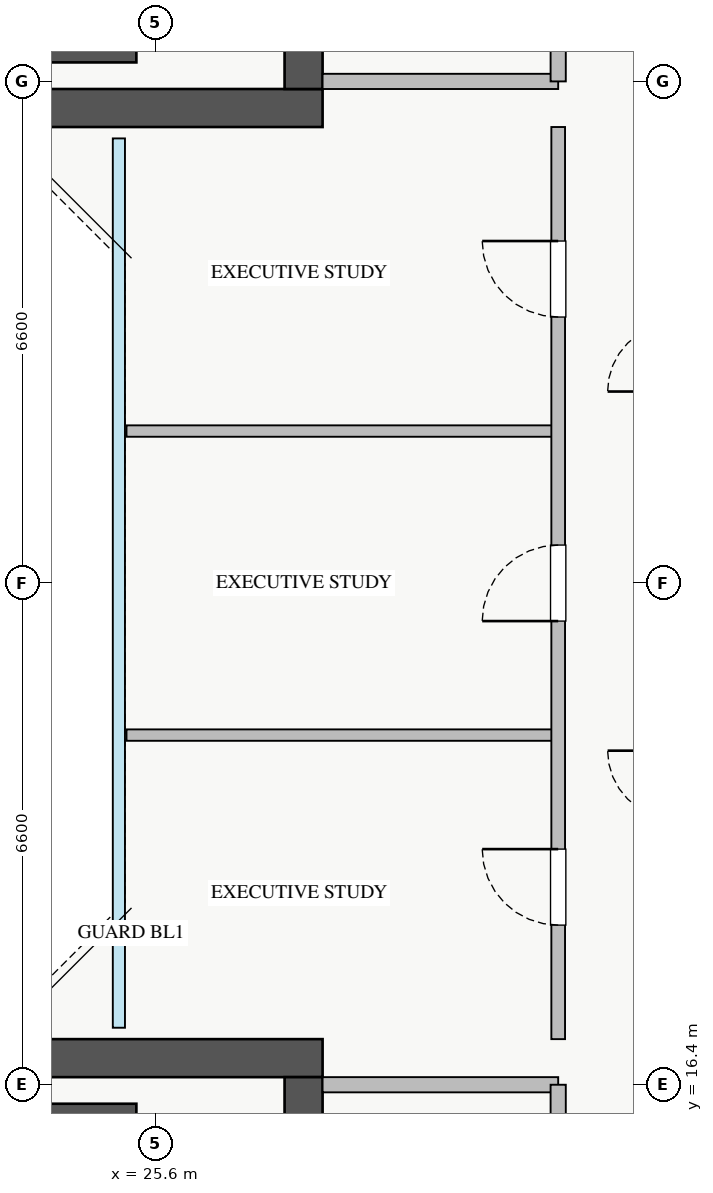
"""IFC4 building model, lengths in metres.
Left out: names, types, materials, properties, quantities, classifications, styles, units other than length and angle.
Written with IfcOpenShell. Run it as: python <this file> out.ifc"""

import sys

from ifc_helpers import new_model, si_unit, direction, frame, frame_2d, origin, place, context, subcontext, project, spatial, rectangle, extrude, source, transform, mapped, element, fill, save


model = new_model("IFC4")
c1 = context("Model", 3, precision=1e-05, world=origin(), true_north=direction((0.0, 1.0)))
c2 = subcontext(c1, "Body", "Model", "MODEL_VIEW")
j1 = project(units=[si_unit("LENGTHUNIT", "METRE"), si_unit("PLANEANGLEUNIT", "RADIAN")], contexts=[c1])
p1 = place(None, origin())
s1 = spatial("IfcSite", under=j1, at=p1, CompositionType="ELEMENT")
p2 = place(p1, origin())
s2 = spatial("IfcBuilding", under=s1, at=p2, CompositionType="ELEMENT")
p3 = place(p2, frame((0.0, 0.0, 210.0)))
s3 = spatial("IfcBuildingStorey", under=s2, at=p3, CompositionType="ELEMENT", Elevation=210.0)
for number, where, z_axis, x_axis in (
    (1, (18.2, 29.95, 0.0), (0.0, 0.0, 1.0), (1.0, 0.0, 0.0)),
    (2, (18.2, 16.05, 0.0), (0.0, 0.0, 1.0), (1.0, 0.0, 0.0)),
):
    element("IfcWall", number, at=place(p3, frame(where, z_axis=z_axis, x_axis=x_axis)), inside=s3, PredefinedType="SHEAR", context=c2, shape_type="SweptSolid", body=[
        extrude(rectangle(XDim=7.15, YDim=0.2, at=frame_2d((3.575, 0.0))), origin(), (0.0, 0.0, 1.0), 3.25),
    ])
p4 = place(p3, frame((10.2, 29.25, 0.0), z_axis=(0.0, 0.0, 1.0), x_axis=(1.0, 0.0, 0.0)))
e3 = element("IfcWall", 3, at=p4, inside=s3, PredefinedType="SHEAR", context=c2, shape_type="SweptSolid", body=[
    extrude(rectangle(XDim=17.6, YDim=0.5, at=frame_2d((8.8, 0.0))), origin(), (0.0, 0.0, 1.0), 3.25),
])
p5 = place(p3, frame((27.55, 29.5, 0.0), z_axis=(0.0, 0.0, 1.0), x_axis=(0.0, 1.0, 0.0)))
e4 = element("IfcWall", 4, at=p5, inside=s3, PredefinedType="SHEAR", context=c2, shape_type="SweptSolid", body=[
    extrude(rectangle(XDim=6.2, YDim=0.5, at=frame_2d((3.1, 0.0))), origin(), (0.0, 0.0, 1.0), 3.25),
])
p6 = place(p5, frame((1.1, 0.0, 0.0)))
e5 = element("IfcOpeningElement", 5, at=p6, cuts=e4, PredefinedType="OPENING", context=c2, shape_type="SweptSolid", body=[
    extrude(rectangle(XDim=1.3, YDim=2.05, at=frame_2d((0.65, 1.025))), frame((0.0, 0.26, 0.0), z_axis=(0.0, -1.0, 0.0), x_axis=(1.0, 0.0, 0.0)), (0.0, 0.0, 1.0), 0.52),
])
p7 = place(p3, frame((10.2, 16.75, 0.0), z_axis=(0.0, 0.0, 1.0), x_axis=(1.0, 0.0, 0.0)))
e6 = element("IfcWall", 6, at=p7, inside=s3, PredefinedType="SHEAR", context=c2, shape_type="SweptSolid", body=[
    extrude(rectangle(XDim=17.6, YDim=0.5, at=frame_2d((8.8, 0.0))), origin(), (0.0, 0.0, 1.0), 3.25),
])
p8 = place(p3, frame((27.55, 10.3, 0.0), z_axis=(0.0, 0.0, 1.0), x_axis=(0.0, 1.0, 0.0)))
e7 = element("IfcWall", 7, at=p8, inside=s3, PredefinedType="SHEAR", context=c2, shape_type="SweptSolid", body=[
    extrude(rectangle(XDim=6.2, YDim=0.5, at=frame_2d((3.1, 0.0))), origin(), (0.0, 0.0, 1.0), 3.25),
])
p9 = place(p8, frame((2.1, 0.0, 0.0)))
e8 = element("IfcOpeningElement", 8, at=p9, cuts=e7, PredefinedType="OPENING", context=c2, shape_type="SweptSolid", body=[
    extrude(rectangle(XDim=1.3, YDim=2.05, at=frame_2d((0.65, 1.025))), frame((0.0, 0.26, 0.0), z_axis=(0.0, -1.0, 0.0), x_axis=(1.0, 0.0, 0.0)), (0.0, 0.0, 1.0), 0.52),
])
p10 = place(p3, frame((27.8, 29.6, 0.0), z_axis=(0.0, 0.0, 1.0), x_axis=(1.0, 0.0, 0.0)))
e9 = element("IfcWall", 9, at=p10, inside=s3, PredefinedType="PARTITIONING", context=c2, shape_type="SweptSolid", body=[
    extrude(rectangle(XDim=3.1, YDim=0.2, at=frame_2d((1.55, 0.0))), origin(), (0.0, 0.0, 1.0), 3.07),
])
p11 = place(p3, frame((30.9, 29.6, 0.0), z_axis=(0.0, 0.0, 1.0), x_axis=(0.0, 1.0, 0.0)))
e10 = element("IfcWall", 10, at=p11, inside=s3, PredefinedType="PARTITIONING", context=c2, shape_type="SweptSolid", body=[
    extrude(rectangle(XDim=3.9, YDim=0.2, at=frame_2d((1.95, 0.0))), origin(), (0.0, 0.0, 1.0), 3.07),
])
p12 = place(p11, frame((1.4, 0.0, 0.0)))
e11 = element("IfcOpeningElement", 11, at=p12, cuts=e10, PredefinedType="OPENING", context=c2, shape_type="SweptSolid", body=[
    extrude(rectangle(XDim=1.1, YDim=2.05, at=frame_2d((0.55, 1.025))), frame((0.0, 0.11, 0.0), z_axis=(0.0, -1.0, 0.0), x_axis=(1.0, 0.0, 0.0)), (0.0, 0.0, 1.0), 0.22),
])
p13 = place(p3, frame((27.8, 16.4, 0.0), z_axis=(0.0, 0.0, 1.0), x_axis=(1.0, 0.0, 0.0)))
e12 = element("IfcWall", 12, at=p13, inside=s3, PredefinedType="PARTITIONING", context=c2, shape_type="SweptSolid", body=[
    extrude(rectangle(XDim=3.1, YDim=0.2, at=frame_2d((1.55, 0.0))), origin(), (0.0, 0.0, 1.0), 3.07),
])
p14 = place(p3, frame((30.9, 12.5, 0.0), z_axis=(0.0, 0.0, 1.0), x_axis=(0.0, 1.0, 0.0)))
e13 = element("IfcWall", 13, at=p14, inside=s3, PredefinedType="PARTITIONING", context=c2, shape_type="SweptSolid", body=[
    extrude(rectangle(XDim=3.9, YDim=0.2, at=frame_2d((1.95, 0.0))), origin(), (0.0, 0.0, 1.0), 3.07),
])
p15 = place(p14, frame((1.4, 0.0, 0.0)))
e14 = element("IfcOpeningElement", 14, at=p15, cuts=e13, PredefinedType="OPENING", context=c2, shape_type="SweptSolid", body=[
    extrude(rectangle(XDim=1.1, YDim=2.05, at=frame_2d((0.55, 1.025))), frame((0.0, 0.11, 0.0), z_axis=(0.0, -1.0, 0.0), x_axis=(1.0, 0.0, 0.0)), (0.0, 0.0, 1.0), 0.22),
])
for number, where, z_axis, x_axis in (
    (15, (25.22, 21.0, 0.0), (0.0, 0.0, 1.0), (1.0, 0.0, 0.0)),
    (16, (25.22, 25.0, 0.0), (0.0, 0.0, 1.0), (1.0, 0.0, 0.0)),
):
    element("IfcWall", number, at=place(p3, frame(where, z_axis=z_axis, x_axis=x_axis)), inside=s3, PredefinedType="PARTITIONING", context=c2, shape_type="SweptSolid", body=[
        extrude(rectangle(XDim=5.68, YDim=0.15, at=frame_2d((2.84, 0.0))), origin(), (0.0, 0.0, 1.0), 3.07),
    ])
p16 = place(p3, frame((30.9, 17.0, 0.0), z_axis=(0.0, 0.0, 1.0), x_axis=(0.0, 1.0, 0.0)))
e17 = element("IfcWall", 17, at=p16, inside=s3, PredefinedType="PARTITIONING", context=c2, shape_type="SweptSolid", body=[
    extrude(rectangle(XDim=12.0, YDim=0.18, at=frame_2d((6.0, 0.0))), origin(), (0.0, 0.0, 1.0), 3.07),
])
p17 = place(p16, frame((1.5, 0.0, 0.0)))
e18 = element("IfcOpeningElement", 18, at=p17, cuts=e17, PredefinedType="OPENING", context=c2, shape_type="SweptSolid", body=[
    extrude(rectangle(XDim=1.0, YDim=2.05, at=frame_2d((0.5, 1.025))), frame((0.0, 0.1, 0.0), z_axis=(0.0, -1.0, 0.0), x_axis=(1.0, 0.0, 0.0)), (0.0, 0.0, 1.0), 0.2),
])
p18 = place(p16, frame((5.5, 0.0, 0.0)))
e19 = element("IfcOpeningElement", 19, at=p18, cuts=e17, PredefinedType="OPENING", context=c2, shape_type="SweptSolid", body=[
    extrude(rectangle(XDim=1.0, YDim=2.05, at=frame_2d((0.5, 1.025))), frame((0.0, 0.1, 0.0), z_axis=(0.0, -1.0, 0.0), x_axis=(1.0, 0.0, 0.0)), (0.0, 0.0, 1.0), 0.2),
])
p19 = place(p16, frame((9.5, 0.0, 0.0)))
e20 = element("IfcOpeningElement", 20, at=p19, cuts=e17, PredefinedType="OPENING", context=c2, shape_type="SweptSolid", body=[
    extrude(rectangle(XDim=1.0, YDim=2.05, at=frame_2d((0.5, 1.025))), frame((0.0, 0.1, 0.0), z_axis=(0.0, -1.0, 0.0), x_axis=(1.0, 0.0, 0.0)), (0.0, 0.0, 1.0), 0.2),
])
m1 = source(origin(), c2, "Body", "SweptSolid", [
    extrude(rectangle(XDim=1.0, YDim=2.05, at=frame_2d((0.5, 1.025))), frame((0.0, 0.025, 0.0), z_axis=(0.0, -1.0, 0.0), x_axis=(1.0, 0.0, 0.0)), (0.0, 0.0, 1.0), 0.05),
])
p20 = place(p17, origin())
e21 = element("IfcDoor", 21, at=p20, inside=s3, OperationType="SINGLE_SWING_RIGHT", PredefinedType="DOOR", context=c2, shape_type="MappedRepresentation", body=[
    mapped(m1, transform((0.0, 0.0, 0.0), x_axis=(1.0, 0.0, 0.0), y_axis=(0.0, 1.0, 0.0), z_axis=(0.0, 0.0, 1.0), scale=1.0)),
])
fill(e18, e21)
p21 = place(p18, origin())
e22 = element("IfcDoor", 22, at=p21, inside=s3, OperationType="SINGLE_SWING_LEFT", PredefinedType="DOOR", context=c2, shape_type="MappedRepresentation", body=[
    mapped(m1, transform((0.0, 0.0, 0.0), x_axis=(1.0, 0.0, 0.0), y_axis=(0.0, 1.0, 0.0), z_axis=(0.0, 0.0, 1.0), scale=1.0)),
])
fill(e19, e22)
p22 = place(p19, origin())
e23 = element("IfcDoor", 23, at=p22, inside=s3, OperationType="SINGLE_SWING_RIGHT", PredefinedType="DOOR", context=c2, shape_type="MappedRepresentation", body=[
    mapped(m1, transform((0.0, 0.0, 0.0), x_axis=(1.0, 0.0, 0.0), y_axis=(0.0, 1.0, 0.0), z_axis=(0.0, 0.0, 1.0), scale=1.0)),
])
fill(e20, e23)
save(model, sys.argv[1])
